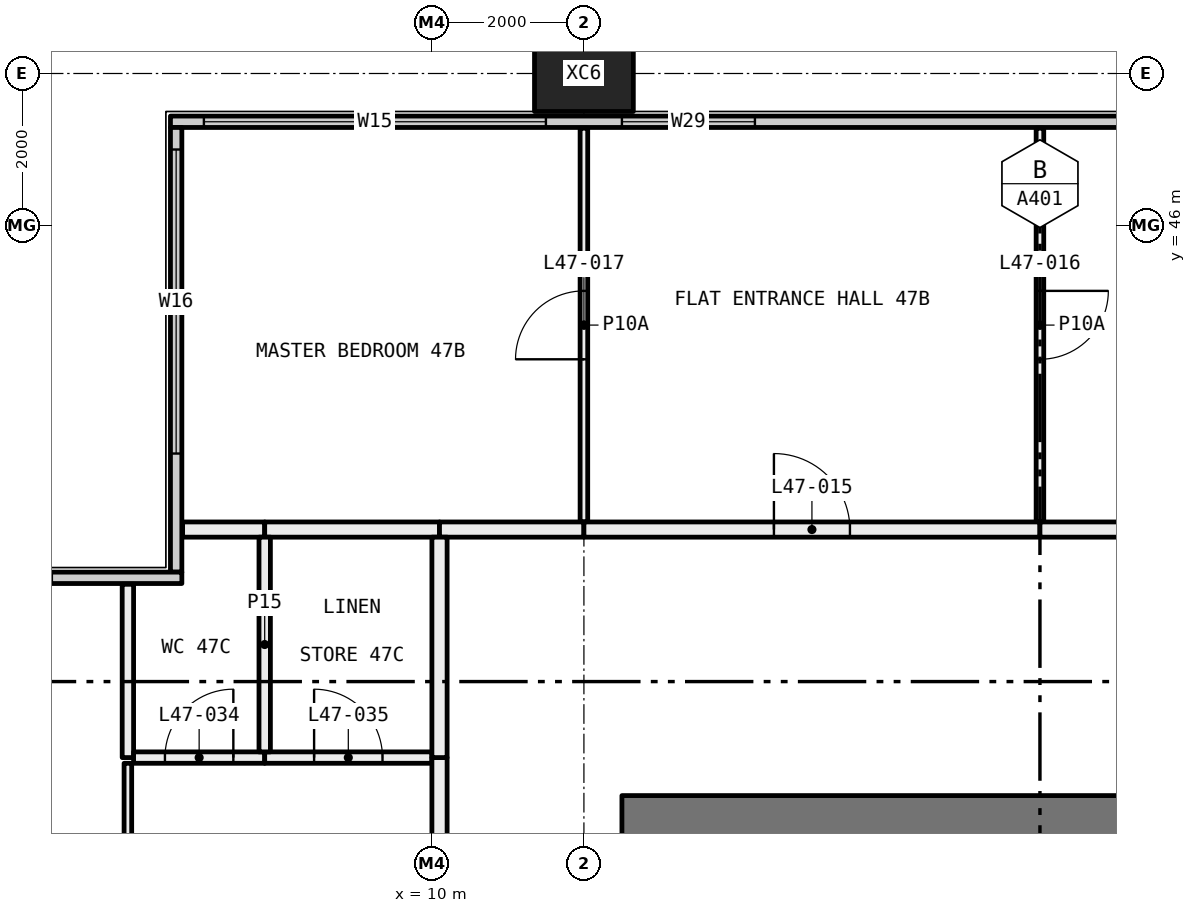
"""IFC4 building model, lengths in metres.
Left out: names, types, materials, properties, quantities, classifications, styles, units other than length and angle.
Written with IfcOpenShell. Run it as: python <this file> out.ifc"""

import sys

from ifc_helpers import new_model, si_unit, direction, frame, frame_2d, origin, origin_2d, place, context, subcontext, project, spatial, rectangle, hollow_rectangle, extrude, element, fill, save


model = new_model("IFC4")
c1 = context("Model", 3, precision=1e-05, world=origin(), true_north=direction((0.0, 1.0)))
c2 = subcontext(c1, "Body", "Model", "MODEL_VIEW")
j1 = project(units=[si_unit("LENGTHUNIT", "METRE"), si_unit("PLANEANGLEUNIT", "RADIAN")], contexts=[c1])
p1 = place(None, origin())
s1 = spatial("IfcSite", under=j1, at=p1, CompositionType="ELEMENT")
p2 = place(p1, origin())
s2 = spatial("IfcBuilding", under=s1, at=p2, CompositionType="ELEMENT")
p3 = place(p2, frame((0.0, 0.0, 178.95)))
s3 = spatial("IfcBuildingStorey", under=s2, at=p3, CompositionType="ELEMENT", Elevation=178.95)
p4 = place(p3, frame((12.0, 48.0, -0.4), z_axis=(0.0, 0.0, 1.0), x_axis=(1.0, 0.0, 0.0)))
e1 = element("IfcColumn", 1, at=p4, inside=s3, PredefinedType="COLUMN", context=c2, shape_type="SweptSolid", body=[
    extrude(hollow_rectangle(XDim=1.3, YDim=1.0, WallThickness=0.05, at=origin_2d()), origin(), (0.0, 0.0, 1.0), 3.45),
])
p5 = place(p3, frame((6.56, 47.365, 0.0), z_axis=(0.0, 0.0, 1.0), x_axis=(1.0, 0.0, 0.0)))
e2 = element("IfcWall", 2, at=p5, inside=s3, PredefinedType="ELEMENTEDWALL", context=c2, shape_type="SweptSolid", body=[
    extrude(rectangle(XDim=46.88, YDim=0.15, at=frame_2d((23.44, 0.0))), origin(), (0.0, 0.0, 1.0), 3.05),
])
p6 = place(p5, frame((0.44, 0.0, 0.45)))
e3 = element("IfcOpeningElement", 3, at=p6, cuts=e2, PredefinedType="OPENING", context=c2, shape_type="SweptSolid", body=[
    extrude(rectangle(XDim=4.5, YDim=2.55, at=frame_2d((2.25, 1.275))), frame((0.0, 0.085, 0.0), z_axis=(0.0, -1.0, 0.0), x_axis=(1.0, 0.0, 0.0)), (0.0, 0.0, 1.0), 0.17),
])
p7 = place(p5, frame((5.94, 0.0, 0.45)))
e4 = element("IfcOpeningElement", 4, at=p7, cuts=e2, PredefinedType="OPENING", context=c2, shape_type="SweptSolid", body=[
    extrude(rectangle(XDim=1.75, YDim=2.55, at=frame_2d((0.875, 1.275))), frame((0.0, 0.085, 0.0), z_axis=(0.0, -1.0, 0.0), x_axis=(1.0, 0.0, 0.0)), (0.0, 0.0, 1.0), 0.17),
])
p8 = place(p5, frame((15.19, 0.0, 0.45)))
e5 = element("IfcOpeningElement", 5, at=p8, cuts=e2, PredefinedType="OPENING", context=c2, shape_type="SweptSolid", body=[
    extrude(rectangle(XDim=1.75, YDim=2.55, at=frame_2d((0.875, 1.275))), frame((0.0, 0.085, 0.0), z_axis=(0.0, -1.0, 0.0), x_axis=(1.0, 0.0, 0.0)), (0.0, 0.0, 1.0), 0.17),
])
p9 = place(p5, frame((17.94, 0.0, 0.45)))
e6 = element("IfcOpeningElement", 6, at=p9, cuts=e2, PredefinedType="OPENING", context=c2, shape_type="SweptSolid", body=[
    extrude(rectangle(XDim=1.75, YDim=2.55, at=frame_2d((0.875, 1.275))), frame((0.0, 0.085, 0.0), z_axis=(0.0, -1.0, 0.0), x_axis=(1.0, 0.0, 0.0)), (0.0, 0.0, 1.0), 0.17),
])
p10 = place(p5, frame((27.19, 0.0, 0.45)))
e7 = element("IfcOpeningElement", 7, at=p10, cuts=e2, PredefinedType="OPENING", context=c2, shape_type="SweptSolid", body=[
    extrude(rectangle(XDim=1.75, YDim=2.55, at=frame_2d((0.875, 1.275))), frame((0.0, 0.085, 0.0), z_axis=(0.0, -1.0, 0.0), x_axis=(1.0, 0.0, 0.0)), (0.0, 0.0, 1.0), 0.17),
])
p11 = place(p5, frame((29.94, 0.0, 0.45)))
e8 = element("IfcOpeningElement", 8, at=p11, cuts=e2, PredefinedType="OPENING", context=c2, shape_type="SweptSolid", body=[
    extrude(rectangle(XDim=1.75, YDim=2.55, at=frame_2d((0.875, 1.275))), frame((0.0, 0.085, 0.0), z_axis=(0.0, -1.0, 0.0), x_axis=(1.0, 0.0, 0.0)), (0.0, 0.0, 1.0), 0.17),
])
p12 = place(p5, frame((39.19, 0.0, 0.45)))
e9 = element("IfcOpeningElement", 9, at=p12, cuts=e2, PredefinedType="OPENING", context=c2, shape_type="SweptSolid", body=[
    extrude(rectangle(XDim=1.75, YDim=2.55, at=frame_2d((0.875, 1.275))), frame((0.0, 0.085, 0.0), z_axis=(0.0, -1.0, 0.0), x_axis=(1.0, 0.0, 0.0)), (0.0, 0.0, 1.0), 0.17),
])
p13 = place(p5, frame((41.94, 0.0, 0.45)))
e10 = element("IfcOpeningElement", 10, at=p13, cuts=e2, PredefinedType="OPENING", context=c2, shape_type="SweptSolid", body=[
    extrude(rectangle(XDim=4.5, YDim=2.55, at=frame_2d((2.25, 1.275))), frame((0.0, 0.085, 0.0), z_axis=(0.0, -1.0, 0.0), x_axis=(1.0, 0.0, 0.0)), (0.0, 0.0, 1.0), 0.17),
])
p14 = place(p3, frame((6.635, 41.44, 0.0), z_axis=(0.0, 0.0, 1.0), x_axis=(0.0, 1.0, 0.0)))
e11 = element("IfcWall", 11, at=p14, inside=s3, PredefinedType="ELEMENTEDWALL", context=c2, shape_type="SweptSolid", body=[
    extrude(rectangle(XDim=5.85, YDim=0.15, at=frame_2d((2.925, 0.0))), origin(), (0.0, 0.0, 1.0), 3.05),
])
p15 = place(p14, frame((1.56, 0.0, 0.45)))
e12 = element("IfcOpeningElement", 12, at=p15, cuts=e11, PredefinedType="OPENING", context=c2, shape_type="SweptSolid", body=[
    extrude(rectangle(XDim=4.0, YDim=2.55, at=frame_2d((2.0, 1.275))), frame((0.0, 0.085, 0.0), z_axis=(0.0, -1.0, 0.0), x_axis=(1.0, 0.0, 0.0)), (0.0, 0.0, 1.0), 0.17),
])
p16 = place(p3, frame((0.56, 41.365, 0.0), z_axis=(0.0, 0.0, 1.0), x_axis=(1.0, 0.0, 0.0)))
e13 = element("IfcWall", 13, at=p16, inside=s3, PredefinedType="ELEMENTEDWALL", context=c2, shape_type="SweptSolid", body=[
    extrude(rectangle(XDim=6.15, YDim=0.15, at=frame_2d((3.075, 0.0))), origin(), (0.0, 0.0, 1.0), 3.05),
])
p17 = place(p16, frame((0.44, 0.0, 0.45)))
e14 = element("IfcOpeningElement", 14, at=p17, cuts=e13, PredefinedType="OPENING", context=c2, shape_type="SweptSolid", body=[
    extrude(rectangle(XDim=4.0, YDim=2.55, at=frame_2d((2.0, 1.275))), frame((0.0, 0.085, 0.0), z_axis=(0.0, -1.0, 0.0), x_axis=(1.0, 0.0, 0.0)), (0.0, 0.0, 1.0), 0.17),
])
p18 = place(p3, frame((12.0, 42.1, 0.0), z_axis=(0.0, 0.0, 1.0), x_axis=(0.0, 1.0, 0.0)))
e15 = element("IfcWall", 15, at=p18, inside=s3, PredefinedType="PARTITIONING", context=c2, shape_type="SweptSolid", body=[
    extrude(rectangle(XDim=5.18, YDim=0.1, at=frame_2d((2.59, 0.0))), origin(), (0.0, 0.0, 1.0), 3.05),
])
p19 = place(p18, frame((2.14, 0.0, 0.0)))
e16 = element("IfcOpeningElement", 16, at=p19, cuts=e15, PredefinedType="OPENING", context=c2, shape_type="SweptSolid", body=[
    extrude(rectangle(XDim=0.9, YDim=2.1, at=frame_2d((0.45, 1.05))), frame((0.0, 0.06, 0.0), z_axis=(0.0, -1.0, 0.0), x_axis=(1.0, 0.0, 0.0)), (0.0, 0.0, 1.0), 0.12),
])
p20 = place(p3, frame((6.72, 42.0, 0.0), z_axis=(0.0, 0.0, 1.0), x_axis=(1.0, 0.0, 0.0)))
e17 = element("IfcWall", 17, at=p20, inside=s3, PredefinedType="PARTITIONING", context=c2, shape_type="SweptSolid", body=[
    extrude(rectangle(XDim=1.08, YDim=0.2, at=frame_2d((0.54, 0.0))), origin(), (0.0, 0.0, 1.0), 3.05),
])
p21 = place(p3, frame((7.8, 42.0, 0.0), z_axis=(0.0, 0.0, 1.0), x_axis=(1.0, 0.0, 0.0)))
e18 = element("IfcWall", 18, at=p21, inside=s3, PredefinedType="PARTITIONING", context=c2, shape_type="SweptSolid", body=[
    extrude(rectangle(XDim=2.3, YDim=0.2, at=frame_2d((1.15, 0.0))), origin(), (0.0, 0.0, 1.0), 3.05),
])
p22 = place(p3, frame((10.1, 42.0, 0.0), z_axis=(0.0, 0.0, 1.0), x_axis=(1.0, 0.0, 0.0)))
e19 = element("IfcWall", 19, at=p22, inside=s3, PredefinedType="PARTITIONING", context=c2, shape_type="SweptSolid", body=[
    extrude(rectangle(XDim=1.9, YDim=0.2, at=frame_2d((0.95, 0.0))), origin(), (0.0, 0.0, 1.0), 3.05),
])
p23 = place(p3, frame((18.0, 42.1, 0.0), z_axis=(0.0, 0.0, 1.0), x_axis=(0.0, 1.0, 0.0)))
e20 = element("IfcWall", 20, at=p23, inside=s3, PredefinedType="PARTITIONING", context=c2, shape_type="SweptSolid", body=[
    extrude(rectangle(XDim=5.18, YDim=0.1, at=frame_2d((2.59, 0.0))), origin(), (0.0, 0.0, 1.0), 3.05),
])
p24 = place(p23, frame((2.14, 0.0, 0.0)))
e21 = element("IfcOpeningElement", 21, at=p24, cuts=e20, PredefinedType="OPENING", context=c2, shape_type="SweptSolid", body=[
    extrude(rectangle(XDim=0.9, YDim=2.1, at=frame_2d((0.45, 1.05))), frame((0.0, 0.06, 0.0), z_axis=(0.0, -1.0, 0.0), x_axis=(1.0, 0.0, 0.0)), (0.0, 0.0, 1.0), 0.12),
])
p25 = place(p3, frame((12.0, 42.0, 0.0), z_axis=(0.0, 0.0, 1.0), x_axis=(1.0, 0.0, 0.0)))
e22 = element("IfcWall", 22, at=p25, inside=s3, PredefinedType="PARTITIONING", context=c2, shape_type="SweptSolid", body=[
    extrude(rectangle(XDim=6.0, YDim=0.2, at=frame_2d((3.0, 0.0))), origin(), (0.0, 0.0, 1.0), 3.05),
])
p26 = place(p25, frame((2.5, 0.0, 0.0)))
e23 = element("IfcOpeningElement", 23, at=p26, cuts=e22, PredefinedType="OPENING", context=c2, shape_type="SweptSolid", body=[
    extrude(rectangle(XDim=1.0, YDim=2.1, at=frame_2d((0.5, 1.05))), frame((0.0, 0.11, 0.0), z_axis=(0.0, -1.0, 0.0), x_axis=(1.0, 0.0, 0.0)), (0.0, 0.0, 1.0), 0.22),
])
p27 = place(p3, frame((18.0, 42.0, 0.0), z_axis=(0.0, 0.0, 1.0), x_axis=(1.0, 0.0, 0.0)))
e24 = element("IfcWall", 24, at=p27, inside=s3, PredefinedType="PARTITIONING", context=c2, shape_type="SweptSolid", body=[
    extrude(rectangle(XDim=6.0, YDim=0.2, at=frame_2d((3.0, 0.0))), origin(), (0.0, 0.0, 1.0), 3.05),
])
p28 = place(p3, frame((6.0, 36.05, 0.0), z_axis=(0.0, 0.0, 1.0), x_axis=(0.0, 1.0, 0.0)))
e25 = element("IfcWall", 25, at=p28, inside=s3, PredefinedType="PARTITIONING", context=c2, shape_type="SweptSolid", body=[
    extrude(rectangle(XDim=2.875, YDim=0.1, at=frame_2d((1.438, 0.0))), origin(), (0.0, 0.0, 1.0), 2.45),
])
p29 = place(p3, frame((6.0, 39.0, 0.0), z_axis=(0.0, 0.0, 1.0), x_axis=(0.0, 1.0, 0.0)))
e26 = element("IfcWall", 26, at=p29, inside=s3, PredefinedType="PARTITIONING", context=c2, shape_type="SweptSolid", body=[
    extrude(rectangle(XDim=2.28, YDim=0.15, at=frame_2d((1.14, 0.0))), origin(), (0.0, 0.0, 1.0), 3.05),
])
p30 = place(p3, frame((7.8, 39.0, 0.0), z_axis=(0.0, 0.0, 1.0), x_axis=(-1.0, 0.0, 0.0)))
e27 = element("IfcWall", 27, at=p30, inside=s3, PredefinedType="PARTITIONING", context=c2, shape_type="SweptSolid", body=[
    extrude(rectangle(XDim=1.725, YDim=0.15, at=frame_2d((0.863, 0.0))), origin(), (0.0, 0.0, 1.0), 3.05),
])
p31 = place(p30, frame((0.413, 0.0, 0.0)))
e28 = element("IfcOpeningElement", 28, at=p31, cuts=e27, PredefinedType="OPENING", context=c2, shape_type="SweptSolid", body=[
    extrude(rectangle(XDim=0.9, YDim=2.1, at=frame_2d((0.45, 1.05))), frame((0.0, 0.085, 0.0), z_axis=(0.0, -1.0, 0.0), x_axis=(1.0, 0.0, 0.0)), (0.0, 0.0, 1.0), 0.17),
])
p32 = place(p3, frame((10.0, 39.0, 0.0), z_axis=(0.0, 0.0, 1.0), x_axis=(-1.0, 0.0, 0.0)))
e29 = element("IfcWall", 29, at=p32, inside=s3, PredefinedType="PARTITIONING", context=c2, shape_type="SweptSolid", body=[
    extrude(rectangle(XDim=2.2, YDim=0.15, at=frame_2d((1.1, 0.0))), origin(), (0.0, 0.0, 1.0), 3.05),
])
p33 = place(p32, frame((0.65, 0.0, 0.0)))
e30 = element("IfcOpeningElement", 30, at=p33, cuts=e29, PredefinedType="OPENING", context=c2, shape_type="SweptSolid", body=[
    extrude(rectangle(XDim=0.9, YDim=2.1, at=frame_2d((0.45, 1.05))), frame((0.0, 0.085, 0.0), z_axis=(0.0, -1.0, 0.0), x_axis=(1.0, 0.0, 0.0)), (0.0, 0.0, 1.0), 0.17),
])
p34 = place(p3, frame((10.1, 36.1, 0.0), z_axis=(0.0, 0.0, 1.0), x_axis=(0.0, 1.0, 0.0)))
e31 = element("IfcWall", 31, at=p34, inside=s3, PredefinedType="PARTITIONING", context=c2, shape_type="SweptSolid", body=[
    extrude(rectangle(XDim=2.9, YDim=0.2, at=frame_2d((1.45, 0.0))), origin(), (0.0, 0.0, 1.0), 3.05),
])
p35 = place(p3, frame((7.8, 39.075, 0.0), z_axis=(0.0, 0.0, 1.0), x_axis=(0.0, 1.0, 0.0)))
e32 = element("IfcWall", 32, at=p35, inside=s3, PredefinedType="PARTITIONING", context=c2, shape_type="SweptSolid", body=[
    extrude(rectangle(XDim=2.825, YDim=0.15, at=frame_2d((1.413, 0.0))), origin(), (0.0, 0.0, 1.0), 3.05),
])
p36 = place(p3, frame((10.1, 39.0, 0.0), z_axis=(0.0, 0.0, 1.0), x_axis=(0.0, 1.0, 0.0)))
e33 = element("IfcWall", 33, at=p36, inside=s3, PredefinedType="PARTITIONING", context=c2, shape_type="SweptSolid", body=[
    extrude(rectangle(XDim=2.9, YDim=0.2, at=frame_2d((1.45, 0.0))), origin(), (0.0, 0.0, 1.0), 3.05),
])
p37 = place(p3, frame((12.5, 38.225, 0.0), z_axis=(0.0, 0.0, 1.0), x_axis=(1.0, 0.0, 0.0)))
e34 = element("IfcWall", 34, at=p37, inside=s3, PredefinedType="SHEAR", context=c2, shape_type="SweptSolid", body=[
    extrude(rectangle(XDim=11.0, YDim=0.55, at=frame_2d((5.5, 0.0))), origin(), (0.0, 0.0, 1.0), 3.05),
])
p38 = place(p37, frame((8.525, 0.0, 0.0)))
e35 = element("IfcOpeningElement", 35, at=p38, cuts=e34, PredefinedType="OPENING", context=c2, shape_type="SweptSolid", body=[
    extrude(rectangle(XDim=1.6, YDim=2.1, at=frame_2d((0.8, 1.05))), frame((0.0, 0.285, 0.0), z_axis=(0.0, -1.0, 0.0), x_axis=(1.0, 0.0, 0.0)), (0.0, 0.0, 1.0), 0.57),
])
p39 = place(p6, origin())
e36 = element("IfcWindow", 36, at=p39, inside=s3, PartitioningType="SINGLE_PANEL", PredefinedType="WINDOW", context=c2, shape_type="SweptSolid", body=[
    extrude(rectangle(XDim=4.5, YDim=2.55, at=frame_2d((2.25, 1.275))), frame((0.0, 0.03, 0.0), z_axis=(0.0, -1.0, 0.0), x_axis=(1.0, 0.0, 0.0)), (0.0, 0.0, 1.0), 0.06),
])
fill(e3, e36)
p40 = place(p7, origin())
e37 = element("IfcWindow", 37, at=p40, inside=s3, PartitioningType="SINGLE_PANEL", PredefinedType="WINDOW", context=c2, shape_type="SweptSolid", body=[
    extrude(rectangle(XDim=1.75, YDim=2.55, at=frame_2d((0.875, 1.275))), frame((0.0, 0.03, 0.0), z_axis=(0.0, -1.0, 0.0), x_axis=(1.0, 0.0, 0.0)), (0.0, 0.0, 1.0), 0.06),
])
fill(e4, e37)
p41 = place(p15, origin())
e38 = element("IfcWindow", 38, at=p41, inside=s3, PartitioningType="SINGLE_PANEL", PredefinedType="WINDOW", context=c2, shape_type="SweptSolid", body=[
    extrude(rectangle(XDim=4.0, YDim=2.55, at=frame_2d((2.0, 1.275))), frame((0.0, 0.03, 0.0), z_axis=(0.0, -1.0, 0.0), x_axis=(1.0, 0.0, 0.0)), (0.0, 0.0, 1.0), 0.06),
])
fill(e12, e38)
p42 = place(p26, origin())
e39 = element("IfcDoor", 39, at=p42, inside=s3, OperationType="SINGLE_SWING_RIGHT", PredefinedType="DOOR", context=c2, shape_type="SweptSolid", body=[
    extrude(rectangle(XDim=1.0, YDim=2.1, at=frame_2d((0.5, 1.05))), frame((0.0, 0.025, 0.0), z_axis=(0.0, -1.0, 0.0), x_axis=(1.0, 0.0, 0.0)), (0.0, 0.0, 1.0), 0.05),
])
fill(e23, e39)
p43 = place(p24, frame((0.9, 0.0, 0.0), x_axis=(-1.0, 0.0, 0.0)))
e40 = element("IfcDoor", 40, at=p43, inside=s3, OperationType="SINGLE_SWING_RIGHT", PredefinedType="DOOR", context=c2, shape_type="SweptSolid", body=[
    extrude(rectangle(XDim=0.9, YDim=2.1, at=frame_2d((0.45, 1.05))), frame((0.0, 0.025, 0.0), z_axis=(0.0, -1.0, 0.0), x_axis=(1.0, 0.0, 0.0)), (0.0, 0.0, 1.0), 0.05),
])
fill(e21, e40)
p44 = place(p19, origin())
e41 = element("IfcDoor", 41, at=p44, inside=s3, OperationType="SINGLE_SWING_RIGHT", PredefinedType="DOOR", context=c2, shape_type="SweptSolid", body=[
    extrude(rectangle(XDim=0.9, YDim=2.1, at=frame_2d((0.45, 1.05))), frame((0.0, 0.025, 0.0), z_axis=(0.0, -1.0, 0.0), x_axis=(1.0, 0.0, 0.0)), (0.0, 0.0, 1.0), 0.05),
])
fill(e16, e41)
p45 = place(p31, frame((0.9, 0.0, 0.0), x_axis=(-1.0, 0.0, 0.0)))
e42 = element("IfcDoor", 42, at=p45, inside=s3, OperationType="SINGLE_SWING_LEFT", PredefinedType="DOOR", context=c2, shape_type="SweptSolid", body=[
    extrude(rectangle(XDim=0.9, YDim=2.1, at=frame_2d((0.45, 1.05))), frame((0.0, 0.025, 0.0), z_axis=(0.0, -1.0, 0.0), x_axis=(1.0, 0.0, 0.0)), (0.0, 0.0, 1.0), 0.05),
])
fill(e28, e42)
p46 = place(p33, frame((0.9, 0.0, 0.0), x_axis=(-1.0, 0.0, 0.0)))
e43 = element("IfcDoor", 43, at=p46, inside=s3, OperationType="SINGLE_SWING_RIGHT", PredefinedType="DOOR", context=c2, shape_type="SweptSolid", body=[
    extrude(rectangle(XDim=0.9, YDim=2.1, at=frame_2d((0.45, 1.05))), frame((0.0, 0.025, 0.0), z_axis=(0.0, -1.0, 0.0), x_axis=(1.0, 0.0, 0.0)), (0.0, 0.0, 1.0), 0.05),
])
fill(e30, e43)
save(model, sys.argv[1])
